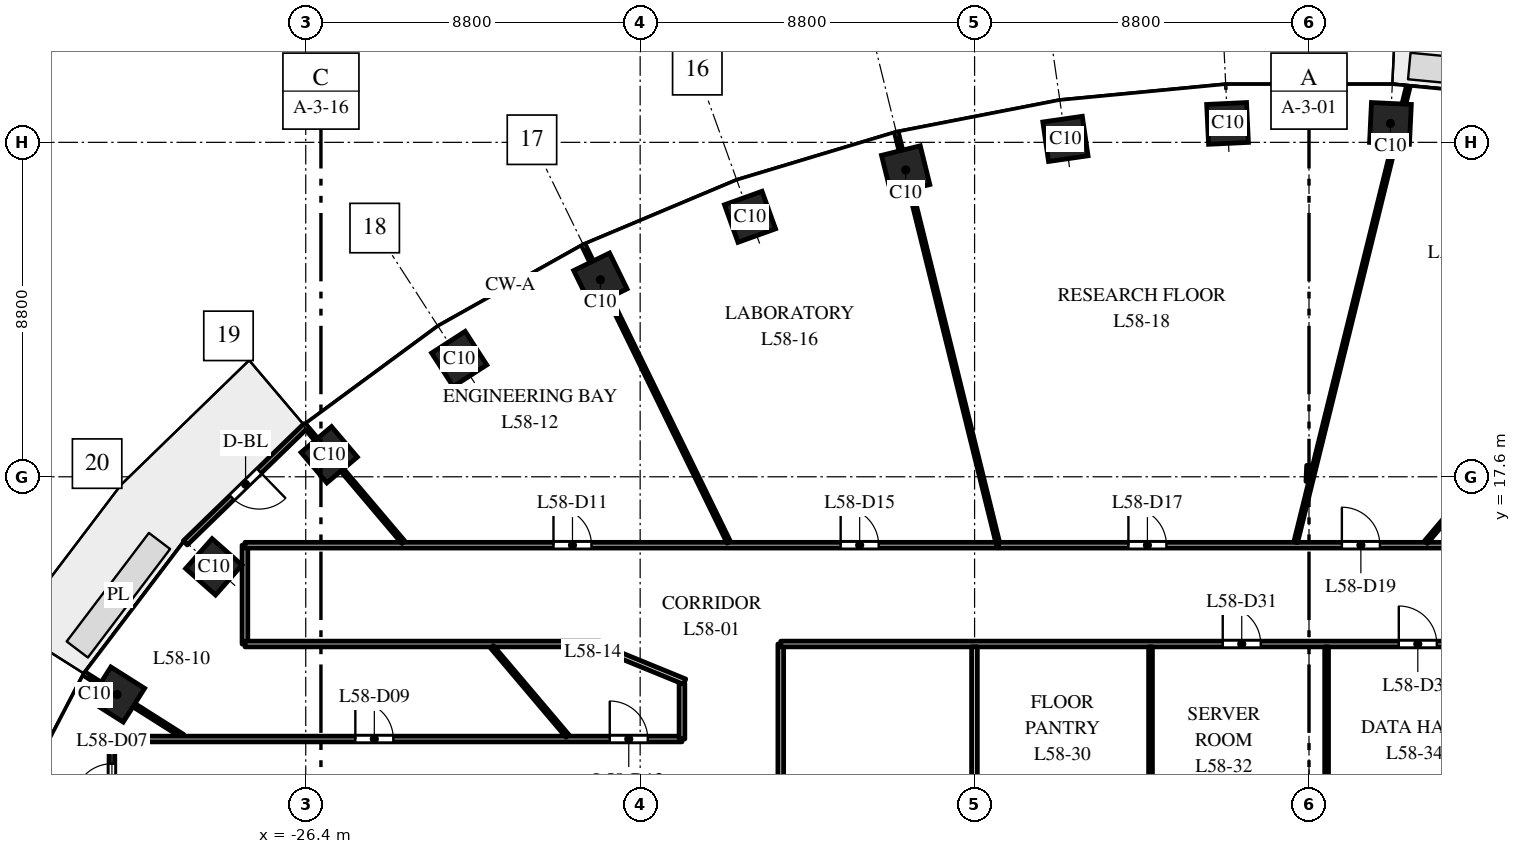
"""IFC4 building model, lengths in metres.
Left out: names, types, materials, properties, quantities, classifications, styles, units other than length and angle.
Written with IfcOpenShell. Run it as: python <this file> out.ifc"""

import sys

from ifc_helpers import new_model, si_unit, direction, frame, frame_2d, origin, origin_2d, place, context, subcontext, project, spatial, rectangle, extrude, element, fill, save


model = new_model("IFC4")
c1 = context("Model", 3, precision=1e-05, world=origin(), true_north=direction((0.0, 1.0)))
c2 = subcontext(c1, "Body", "Model", "MODEL_VIEW")
j1 = project(units=[si_unit("LENGTHUNIT", "METRE"), si_unit("PLANEANGLEUNIT", "RADIAN")], contexts=[c1])
p1 = place(None, origin())
s1 = spatial("IfcSite", under=j1, at=p1, CompositionType="ELEMENT")
p2 = place(p1, origin())
s2 = spatial("IfcBuilding", under=s1, at=p2, CompositionType="ELEMENT")
p3 = place(p2, frame((0.0, 0.0, 273.5)))
s3 = spatial("IfcBuildingStorey", under=s2, at=p3, CompositionType="ELEMENT", Elevation=273.5)
for number, where, z_axis, x_axis in (
    (1, (2.143, 26.898, 0.0), (0.0, 0.0, 1.0), (-0.999, 0.048, 0.0)),
    (2, (-2.143, 26.898, 0.0), (0.0, 0.0, 1.0), (-0.999, -0.048, 0.0)),
    (3, (-6.409, 26.491, 0.0), (0.0, 0.0, 1.0), (-0.99, -0.143, 0.0)),
    (4, (-10.613, 25.674, 0.0), (0.0, 0.0, 1.0), (-0.971, -0.24, 0.0)),
    (5, (-14.709, 24.441, 0.0), (0.0, 0.0, 1.0), (-0.941, -0.338, 0.0)),
    (6, (-18.646, 22.785, 0.0), (0.0, 0.0, 1.0), (-0.898, -0.439, 0.0)),
    (7, (-22.362, 20.7, 0.0), (0.0, 0.0, 1.0), (-0.84, -0.542, 0.0)),
    (8, (-25.783, 18.18, 0.0), (0.0, 0.0, 1.0), (-0.763, -0.646, 0.0)),
    (9, (-28.819, 15.23, 0.0), (0.0, 0.0, 1.0), (-0.663, -0.749, 0.0)),
    (10, (-31.365, 11.871, 0.0), (0.0, 0.0, 1.0), (-0.535, -0.845, 0.0)),
):
    element("IfcColumn", number, at=place(p3, frame(where, z_axis=z_axis, x_axis=x_axis)), inside=s3, PredefinedType="COLUMN", context=c2, shape_type="SweptSolid", body=[
        extrude(rectangle(XDim=1.05, YDim=1.05, at=origin_2d()), origin(), (0.0, 0.0, 1.0), 4.0),
    ])
p4 = place(p3, frame((-26.396, 18.943, 0.0), z_axis=(0.0, 0.0, 1.0), x_axis=(-0.717214761864, -0.696852197647, 0.0)))
e11 = element("IfcWall", 11, at=p4, inside=s3, PredefinedType="STANDARD", context=c2, shape_type="SweptSolid", body=[
    extrude(rectangle(XDim=4.424, YDim=0.15, at=frame_2d((2.212, 0.0))), origin(), (0.0, 0.0, 1.0), 3.7),
])
p5 = place(p4, frame((1.712, 0.0, 0.0)))
e12 = element("IfcOpeningElement", 12, at=p5, cuts=e11, PredefinedType="OPENING", context=c2, shape_type="SweptSolid", body=[
    extrude(rectangle(XDim=1.0, YDim=2.4, at=frame_2d((0.5, 1.2))), frame((0.0, 0.085, 0.0), z_axis=(0.0, -1.0, 0.0), x_axis=(1.0, 0.0, 0.0)), (0.0, 0.0, 1.0), 0.17),
])
p6 = place(p3, frame((-32.212, 12.408, 0.0), z_axis=(0.0, 0.0, 1.0), x_axis=(0.844810627195, -0.535065420467, 0.0)))
e13 = element("IfcWall", 13, at=p6, inside=s3, PredefinedType="PARTITIONING", context=c2, shape_type="SweptSolid", body=[
    extrude(rectangle(XDim=3.048, YDim=0.1, at=frame_2d((1.524, 0.0))), origin(), (0.0, 0.0, 1.0), 3.7),
])
p7 = place(p3, frame((-31.5, 8.5, 0.0), z_axis=(0.0, 0.0, 1.0), x_axis=(0.0, 1.0, 0.0)))
e14 = element("IfcWall", 14, at=p7, inside=s3, PredefinedType="PARTITIONING", context=c2, shape_type="SweptSolid", body=[
    extrude(rectangle(XDim=2.2, YDim=0.15, at=frame_2d((1.1, 0.0))), origin(), (0.0, 0.0, 1.0), 3.7),
])
p8 = place(p7, frame((0.55, 0.0, 0.0)))
e15 = element("IfcOpeningElement", 15, at=p8, cuts=e14, PredefinedType="OPENING", context=c2, shape_type="SweptSolid", body=[
    extrude(rectangle(XDim=1.0, YDim=2.1, at=frame_2d((0.5, 1.05))), frame((0.0, 0.085, 0.0), z_axis=(0.0, -1.0, 0.0), x_axis=(1.0, 0.0, 0.0)), (0.0, 0.0, 1.0), 0.17),
])
p9 = place(p3, frame((-31.5, 10.7, 0.0), z_axis=(0.0, 0.0, 1.0), x_axis=(1.0, 0.0, 0.0)))
e16 = element("IfcWall", 16, at=p9, inside=s3, PredefinedType="PARTITIONING", context=c2, shape_type="SweptSolid", body=[
    extrude(rectangle(XDim=15.0, YDim=0.15, at=frame_2d((7.5, 0.0))), origin(), (0.0, 0.0, 1.0), 3.1),
])
p10 = place(p9, frame((6.405, 0.0, 0.0)))
e17 = element("IfcOpeningElement", 17, at=p10, cuts=e16, PredefinedType="OPENING", context=c2, shape_type="SweptSolid", body=[
    extrude(rectangle(XDim=1.0, YDim=2.1, at=frame_2d((0.5, 1.05))), frame((0.0, 0.085, 0.0), z_axis=(0.0, -1.0, 0.0), x_axis=(1.0, 0.0, 0.0)), (0.0, 0.0, 1.0), 0.17),
])
p11 = place(p9, frame((13.1, 0.0, 0.0)))
e18 = element("IfcOpeningElement", 18, at=p11, cuts=e16, PredefinedType="OPENING", context=c2, shape_type="SweptSolid", body=[
    extrude(rectangle(XDim=1.0, YDim=2.1, at=frame_2d((0.5, 1.05))), frame((0.0, 0.085, 0.0), z_axis=(0.0, -1.0, 0.0), x_axis=(1.0, 0.0, 0.0)), (0.0, 0.0, 1.0), 0.17),
])
p12 = place(p3, frame((-28.0, 13.2, 0.0), z_axis=(0.0, 0.0, 1.0), x_axis=(0.0, 1.0, 0.0)))
e19 = element("IfcWall", 19, at=p12, inside=s3, PredefinedType="PARTITIONING", context=c2, shape_type="SweptSolid", body=[
    extrude(rectangle(XDim=2.6, YDim=0.15, at=frame_2d((1.3, 0.0))), origin(), (0.0, 0.0, 1.0), 3.0),
])
p13 = place(p3, frame((-28.0, 13.2, 0.0), z_axis=(0.0, 0.0, 1.0), x_axis=(1.0, 0.0, 0.0)))
e20 = element("IfcWall", 20, at=p13, inside=s3, PredefinedType="PARTITIONING", context=c2, shape_type="SweptSolid", body=[
    extrude(rectangle(XDim=9.347, YDim=0.15, at=frame_2d((4.673, 0.0))), origin(), (0.0, 0.0, 1.0), 2.75),
])
p14 = place(p3, frame((-28.0, 15.8, 0.0), z_axis=(0.0, 0.0, 1.0), x_axis=(1.0, 0.0, 0.0)))
e21 = element("IfcWall", 21, at=p14, inside=s3, PredefinedType="PARTITIONING", context=c2, shape_type="SweptSolid", body=[
    extrude(rectangle(XDim=19.809, YDim=0.15, at=frame_2d((9.905, 0.0))), origin(), (0.0, 0.0, 1.0), 2.75),
])
p15 = place(p14, frame((8.119, 0.0, 0.0)))
e22 = element("IfcOpeningElement", 22, at=p15, cuts=e21, PredefinedType="OPENING", context=c2, shape_type="SweptSolid", body=[
    extrude(rectangle(XDim=1.0, YDim=2.1, at=frame_2d((0.5, 1.05))), frame((0.0, 0.085, 0.0), z_axis=(0.0, -1.0, 0.0), x_axis=(1.0, 0.0, 0.0)), (0.0, 0.0, 1.0), 0.17),
])
p16 = place(p14, frame((15.676, 0.0, 0.0)))
e23 = element("IfcOpeningElement", 23, at=p16, cuts=e21, PredefinedType="OPENING", context=c2, shape_type="SweptSolid", body=[
    extrude(rectangle(XDim=1.0, YDim=2.1, at=frame_2d((0.5, 1.05))), frame((0.0, 0.085, 0.0), z_axis=(0.0, -1.0, 0.0), x_axis=(1.0, 0.0, 0.0)), (0.0, 0.0, 1.0), 0.17),
])
p17 = place(p3, frame((-26.43, 18.945, 0.0), z_axis=(0.0, 0.0, 1.0), x_axis=(0.646323350317, -0.763063645337, 0.0)))
e24 = element("IfcWall", 24, at=p17, inside=s3, PredefinedType="PARTITIONING", context=c2, shape_type="SweptSolid", body=[
    extrude(rectangle(XDim=4.02, YDim=0.1, at=frame_2d((2.01, 0.0))), origin(), (0.0, 0.0, 1.0), 2.75),
])
p18 = place(p3, frame((-21.499, 13.125, 0.0), z_axis=(0.0, 0.0, 1.0), x_axis=(0.646354899778, -0.763036921474, 0.0)))
e25 = element("IfcWall", 25, at=p18, inside=s3, PredefinedType="PARTITIONING", context=c2, shape_type="SweptSolid", body=[
    extrude(rectangle(XDim=3.076, YDim=0.1, at=frame_2d((1.538, 0.0))), origin(), (0.0, 0.0, 1.0), 3.7),
])
p19 = place(p3, frame((-19.086, 23.685, 0.0), z_axis=(0.0, 0.0, 1.0), x_axis=(0.439174872977, -0.898401597809, 0.0)))
e26 = element("IfcWall", 26, at=p19, inside=s3, PredefinedType="PARTITIONING", context=c2, shape_type="SweptSolid", body=[
    extrude(rectangle(XDim=8.693, YDim=0.1, at=frame_2d((4.347, 0.0))), origin(), (0.0, 0.0, 1.0), 2.85),
])
p20 = place(p3, frame((-18.664, 13.123, 0.0), z_axis=(0.0, 0.0, 1.0), x_axis=(0.925590432986, -0.378526551731, 0.0)))
e27 = element("IfcWall", 27, at=p20, inside=s3, PredefinedType="PARTITIONING", context=c2, shape_type="SweptSolid", body=[
    extrude(rectangle(XDim=2.415, YDim=0.15, at=frame_2d((1.208, 0.0))), origin(), (0.0, 0.0, 1.0), 2.75),
])
p21 = place(p3, frame((-16.5, 10.7, 0.0), z_axis=(0.0, 0.0, 1.0), x_axis=(0.0, 1.0, 0.0)))
e28 = element("IfcWall", 28, at=p21, inside=s3, PredefinedType="PARTITIONING", context=c2, shape_type="SweptSolid", body=[
    extrude(rectangle(XDim=1.457, YDim=0.15, at=frame_2d((0.729, 0.0))), origin(), (0.0, 0.0, 1.0), 2.75),
])
p22 = place(p3, frame((-13.9, -13.2, 0.0), z_axis=(0.0, 0.0, 1.0), x_axis=(0.0, 1.0, 0.0)))
e29 = element("IfcWall", 29, at=p22, inside=s3, PredefinedType="PARTITIONING", context=c2, shape_type="SweptSolid", body=[
    extrude(rectangle(XDim=26.4, YDim=0.15, at=frame_2d((13.2, 0.0))), origin(), (0.0, 0.0, 1.0), 2.75),
])
p23 = place(p22, frame((12.65, 0.0, 0.0)))
e30 = element("IfcOpeningElement", 30, at=p23, cuts=e29, PredefinedType="OPENING", context=c2, shape_type="SweptSolid", body=[
    extrude(rectangle(XDim=1.0, YDim=2.1, at=frame_2d((0.5, 1.05))), frame((0.0, 0.085, 0.0), z_axis=(0.0, -1.0, 0.0), x_axis=(1.0, 0.0, 0.0)), (0.0, 0.0, 1.0), 0.17),
])
p24 = place(p3, frame((-13.9, 13.2, 0.0), z_axis=(0.0, 0.0, 1.0), x_axis=(1.0, 0.0, 0.0)))
e31 = element("IfcWall", 31, at=p24, inside=s3, PredefinedType="PARTITIONING", context=c2, shape_type="SweptSolid", body=[
    extrude(rectangle(XDim=27.8, YDim=0.15, at=frame_2d((13.9, 0.0))), origin(), (0.0, 0.0, 1.0), 2.85),
])
p25 = place(p24, frame((11.63, 0.0, 0.0)))
e32 = element("IfcOpeningElement", 32, at=p25, cuts=e31, PredefinedType="OPENING", context=c2, shape_type="SweptSolid", body=[
    extrude(rectangle(XDim=1.0, YDim=2.1, at=frame_2d((0.5, 1.05))), frame((0.0, 0.085, 0.0), z_axis=(0.0, -1.0, 0.0), x_axis=(1.0, 0.0, 0.0)), (0.0, 0.0, 1.0), 0.17),
])
p26 = place(p24, frame((16.263, 0.0, 0.0)))
e33 = element("IfcOpeningElement", 33, at=p26, cuts=e31, PredefinedType="OPENING", context=c2, shape_type="SweptSolid", body=[
    extrude(rectangle(XDim=1.0, YDim=2.1, at=frame_2d((0.5, 1.05))), frame((0.0, 0.085, 0.0), z_axis=(0.0, -1.0, 0.0), x_axis=(1.0, 0.0, 0.0)), (0.0, 0.0, 1.0), 0.17),
])
p27 = place(p24, frame((20.897, 0.0, 0.0)))
e34 = element("IfcOpeningElement", 34, at=p27, cuts=e31, PredefinedType="OPENING", context=c2, shape_type="SweptSolid", body=[
    extrude(rectangle(XDim=1.0, YDim=2.1, at=frame_2d((0.5, 1.05))), frame((0.0, 0.085, 0.0), z_axis=(0.0, -1.0, 0.0), x_axis=(1.0, 0.0, 0.0)), (0.0, 0.0, 1.0), 0.17),
])
p28 = place(p3, frame((-10.853, 26.646, 0.0), z_axis=(0.0, 0.0, 1.0), x_axis=(0.239794021926, -0.970823787847, 0.0)))
e35 = element("IfcWall", 35, at=p28, inside=s3, PredefinedType="PARTITIONING", context=c2, shape_type="SweptSolid", body=[
    extrude(rectangle(XDim=11.172, YDim=0.1, at=frame_2d((5.586, 0.0))), origin(), (0.0, 0.0, 1.0), 2.85),
])
p29 = place(p3, frame((-8.803, 1.493, 0.0), z_axis=(0.0, 0.0, 1.0), x_axis=(0.0, 1.0, 0.0)))
e36 = element("IfcWall", 36, at=p29, inside=s3, PredefinedType="PARTITIONING", context=c2, shape_type="SweptSolid", body=[
    extrude(rectangle(XDim=11.632, YDim=0.15, at=frame_2d((5.816, 0.0))), origin(), (0.0, 0.0, 1.0), 2.75),
])
p30 = place(p29, frame((5.559, 0.0, 0.0)))
e37 = element("IfcOpeningElement", 37, at=p30, cuts=e36, PredefinedType="OPENING", context=c2, shape_type="SweptSolid", body=[
    extrude(rectangle(XDim=1.0, YDim=2.1, at=frame_2d((0.5, 1.05))), frame((0.0, 0.085, 0.0), z_axis=(0.0, -1.0, 0.0), x_axis=(1.0, 0.0, 0.0)), (0.0, 0.0, 1.0), 0.17),
])
p31 = place(p3, frame((-8.174, 15.8, 0.0), z_axis=(0.0, 0.0, 1.0), x_axis=(1.0, 0.0, 0.0)))
e38 = element("IfcWall", 38, at=p31, inside=s3, PredefinedType="PARTITIONING", context=c2, shape_type="SweptSolid", body=[
    extrude(rectangle(XDim=19.829, YDim=0.15, at=frame_2d((9.915, 0.0))), origin(), (0.0, 0.0, 1.0), 2.85),
])
p32 = place(p31, frame((3.422, 0.0, 0.0)))
e39 = element("IfcOpeningElement", 39, at=p32, cuts=e38, PredefinedType="OPENING", context=c2, shape_type="SweptSolid", body=[
    extrude(rectangle(XDim=1.0, YDim=2.1, at=frame_2d((0.5, 1.05))), frame((0.0, 0.085, 0.0), z_axis=(0.0, -1.0, 0.0), x_axis=(1.0, 0.0, 0.0)), (0.0, 0.0, 1.0), 0.17),
])
p33 = place(p31, frame((9.039, 0.0, 0.0)))
e40 = element("IfcOpeningElement", 40, at=p33, cuts=e38, PredefinedType="OPENING", context=c2, shape_type="SweptSolid", body=[
    extrude(rectangle(XDim=1.0, YDim=2.1, at=frame_2d((0.5, 1.05))), frame((0.0, 0.085, 0.0), z_axis=(0.0, -1.0, 0.0), x_axis=(1.0, 0.0, 0.0)), (0.0, 0.0, 1.0), 0.17),
])
p34 = place(p31, frame((14.888, 0.0, 0.0)))
e41 = element("IfcOpeningElement", 41, at=p34, cuts=e38, PredefinedType="OPENING", context=c2, shape_type="SweptSolid", body=[
    extrude(rectangle(XDim=1.0, YDim=2.1, at=frame_2d((0.5, 1.05))), frame((0.0, 0.085, 0.0), z_axis=(0.0, -1.0, 0.0), x_axis=(1.0, 0.0, 0.0)), (0.0, 0.0, 1.0), 0.17),
])
p35 = place(p3, frame((-4.17, 6.617, 0.0), z_axis=(0.0, 0.0, 1.0), x_axis=(0.0, 1.0, 0.0)))
e42 = element("IfcWall", 42, at=p35, inside=s3, PredefinedType="PARTITIONING", context=c2, shape_type="SweptSolid", body=[
    extrude(rectangle(XDim=6.508, YDim=0.1, at=frame_2d((3.254, 0.0))), origin(), (0.0, 0.0, 1.0), 2.85),
])
p36 = place(p3, frame((-0.35, 15.879, 0.0), z_axis=(0.0, 0.0, 1.0), x_axis=(0.240720113411, 0.970594573959, 0.0)))
e43 = element("IfcWall", 43, at=p36, inside=s3, PredefinedType="PARTITIONING", context=c2, shape_type="SweptSolid", body=[
    extrude(rectangle(XDim=1.234, YDim=0.1, at=frame_2d((0.617, 0.0))), origin(), (0.0, 0.0, 1.0), 3.7),
])
p37 = place(p3, frame((-0.049, 17.097, 0.0), z_axis=(0.0, 0.0, 1.0), x_axis=(0.239793112589, 0.970824012453, 0.0)))
e44 = element("IfcWall", 44, at=p37, inside=s3, PredefinedType="PARTITIONING", context=c2, shape_type="SweptSolid", body=[
    extrude(rectangle(XDim=11.084, YDim=0.1, at=frame_2d((5.542, 0.0))), origin(), (0.0, 0.0, 1.0), 3.0),
])
p38 = place(p3, frame((-0.03, 17.477, 0.0), z_axis=(0.0, 0.0, 1.0), x_axis=(0.045197383952, 0.998978076078, 0.0)))
e45 = element("IfcWall", 45, at=p38, inside=s3, PredefinedType="PARTITIONING", context=c2, shape_type="SweptSolid", body=[
    extrude(rectangle(XDim=0.421, YDim=0.1, at=frame_2d((0.211, 0.0))), origin(), (0.0, 0.0, 1.0), 3.7),
])
p39 = place(p3, frame((0.463, 7.469, 0.0), z_axis=(0.0, 0.0, 1.0), x_axis=(0.0, 1.0, 0.0)))
e46 = element("IfcWall", 46, at=p39, inside=s3, PredefinedType="PARTITIONING", context=c2, shape_type="SweptSolid", body=[
    extrude(rectangle(XDim=5.656, YDim=0.1, at=frame_2d((2.828, 0.0))), origin(), (0.0, 0.0, 1.0), 3.0),
])
p40 = place(p3, frame((3.075, 15.878, 0.0), z_axis=(0.0, 0.0, 1.0), x_axis=(0.64645132614, 0.762955229966, 0.0)))
e47 = element("IfcWall", 47, at=p40, inside=s3, PredefinedType="PARTITIONING", context=c2, shape_type="SweptSolid", body=[
    extrude(rectangle(XDim=13.69, YDim=0.1, at=frame_2d((6.845, 0.0))), origin(), (0.0, 0.0, 1.0), 2.85),
])
p41 = place(p5, origin())
e48 = element("IfcDoor", 48, at=p41, inside=s3, OperationType="SINGLE_SWING_LEFT", PredefinedType="DOOR", context=c2, shape_type="SweptSolid", body=[
    extrude(rectangle(XDim=1.0, YDim=2.4, at=frame_2d((0.5, 1.2))), frame((0.0, 0.025, 0.0), z_axis=(0.0, -1.0, 0.0), x_axis=(1.0, 0.0, 0.0)), (0.0, 0.0, 1.0), 0.05),
])
fill(e12, e48)
p42 = place(p8, origin())
e49 = element("IfcDoor", 49, at=p42, inside=s3, OperationType="SINGLE_SWING_LEFT", PredefinedType="DOOR", context=c2, shape_type="SweptSolid", body=[
    extrude(rectangle(XDim=1.0, YDim=2.1, at=frame_2d((0.5, 1.05))), frame((0.0, 0.025, 0.0), z_axis=(0.0, -1.0, 0.0), x_axis=(1.0, 0.0, 0.0)), (0.0, 0.0, 1.0), 0.05),
])
fill(e15, e49)
p43 = place(p10, origin())
e50 = element("IfcDoor", 50, at=p43, inside=s3, OperationType="SINGLE_SWING_LEFT", PredefinedType="DOOR", context=c2, shape_type="SweptSolid", body=[
    extrude(rectangle(XDim=1.0, YDim=2.1, at=frame_2d((0.5, 1.05))), frame((0.0, 0.025, 0.0), z_axis=(0.0, -1.0, 0.0), x_axis=(1.0, 0.0, 0.0)), (0.0, 0.0, 1.0), 0.05),
])
fill(e17, e50)
p44 = place(p15, origin())
e51 = element("IfcDoor", 51, at=p44, inside=s3, OperationType="SINGLE_SWING_LEFT", PredefinedType="DOOR", context=c2, shape_type="SweptSolid", body=[
    extrude(rectangle(XDim=1.0, YDim=2.1, at=frame_2d((0.5, 1.05))), frame((0.0, 0.025, 0.0), z_axis=(0.0, -1.0, 0.0), x_axis=(1.0, 0.0, 0.0)), (0.0, 0.0, 1.0), 0.05),
])
fill(e22, e51)
p45 = place(p11, origin())
e52 = element("IfcDoor", 52, at=p45, inside=s3, OperationType="SINGLE_SWING_LEFT", PredefinedType="DOOR", context=c2, shape_type="SweptSolid", body=[
    extrude(rectangle(XDim=1.0, YDim=2.1, at=frame_2d((0.5, 1.05))), frame((0.0, 0.025, 0.0), z_axis=(0.0, -1.0, 0.0), x_axis=(1.0, 0.0, 0.0)), (0.0, 0.0, 1.0), 0.05),
])
fill(e18, e52)
p46 = place(p16, origin())
e53 = element("IfcDoor", 53, at=p46, inside=s3, OperationType="SINGLE_SWING_LEFT", PredefinedType="DOOR", context=c2, shape_type="SweptSolid", body=[
    extrude(rectangle(XDim=1.0, YDim=2.1, at=frame_2d((0.5, 1.05))), frame((0.0, 0.025, 0.0), z_axis=(0.0, -1.0, 0.0), x_axis=(1.0, 0.0, 0.0)), (0.0, 0.0, 1.0), 0.05),
])
fill(e23, e53)
p47 = place(p32, origin())
e54 = element("IfcDoor", 54, at=p47, inside=s3, OperationType="SINGLE_SWING_LEFT", PredefinedType="DOOR", context=c2, shape_type="SweptSolid", body=[
    extrude(rectangle(XDim=1.0, YDim=2.1, at=frame_2d((0.5, 1.05))), frame((0.0, 0.025, 0.0), z_axis=(0.0, -1.0, 0.0), x_axis=(1.0, 0.0, 0.0)), (0.0, 0.0, 1.0), 0.05),
])
fill(e39, e54)
p48 = place(p33, origin())
e55 = element("IfcDoor", 55, at=p48, inside=s3, OperationType="SINGLE_SWING_LEFT", PredefinedType="DOOR", context=c2, shape_type="SweptSolid", body=[
    extrude(rectangle(XDim=1.0, YDim=2.1, at=frame_2d((0.5, 1.05))), frame((0.0, 0.025, 0.0), z_axis=(0.0, -1.0, 0.0), x_axis=(1.0, 0.0, 0.0)), (0.0, 0.0, 1.0), 0.05),
])
fill(e40, e55)
p49 = place(p25, origin())
e56 = element("IfcDoor", 56, at=p49, inside=s3, OperationType="SINGLE_SWING_LEFT", PredefinedType="DOOR", context=c2, shape_type="SweptSolid", body=[
    extrude(rectangle(XDim=1.0, YDim=2.1, at=frame_2d((0.5, 1.05))), frame((0.0, 0.025, 0.0), z_axis=(0.0, -1.0, 0.0), x_axis=(1.0, 0.0, 0.0)), (0.0, 0.0, 1.0), 0.05),
])
fill(e32, e56)
p50 = place(p26, origin())
e57 = element("IfcDoor", 57, at=p50, inside=s3, OperationType="SINGLE_SWING_LEFT", PredefinedType="DOOR", context=c2, shape_type="SweptSolid", body=[
    extrude(rectangle(XDim=1.0, YDim=2.1, at=frame_2d((0.5, 1.05))), frame((0.0, 0.025, 0.0), z_axis=(0.0, -1.0, 0.0), x_axis=(1.0, 0.0, 0.0)), (0.0, 0.0, 1.0), 0.05),
])
fill(e33, e57)
save(model, sys.argv[1])
